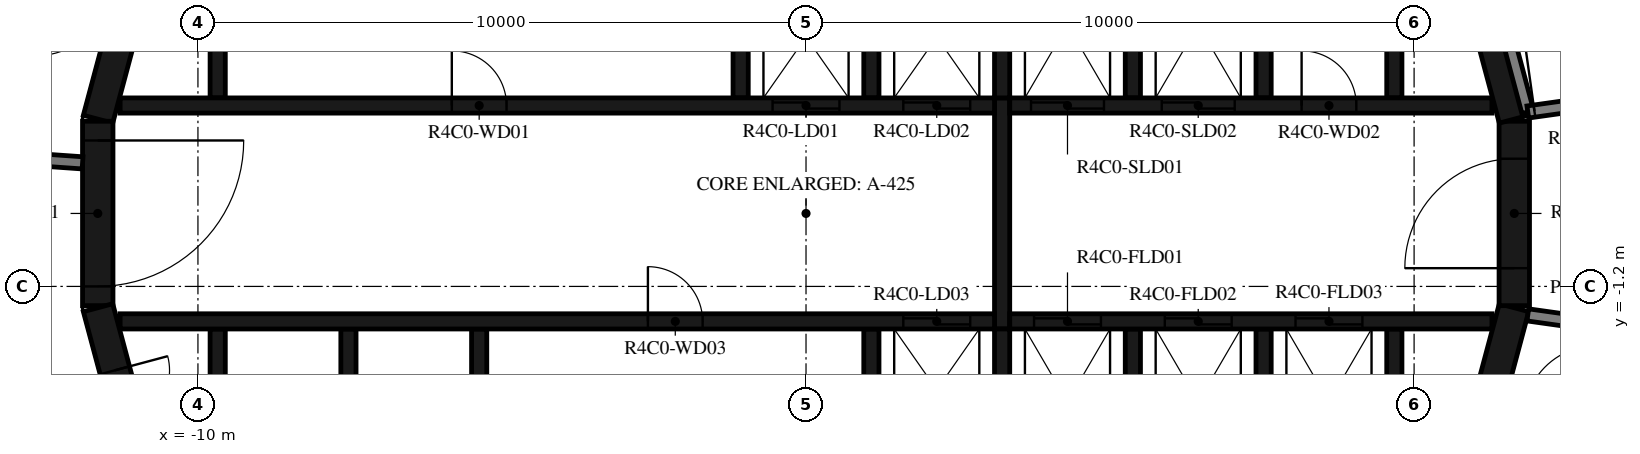
"""IFC4 building model, lengths in metres.
Left out: names, types, materials, properties, quantities, classifications, styles, units other than length and angle.
Written with IfcOpenShell. Run it as: python <this file> out.ifc"""

import sys

from ifc_helpers import new_model, si_unit, direction, frame, frame_2d, origin, place, context, subcontext, project, spatial, polyline, rectangle, outline, extrude, element, fill, save


model = new_model("IFC4")
c1 = context("Model", 3, precision=1e-05, world=origin(), true_north=direction((0.0, 1.0)))
c2 = subcontext(c1, "Body", "Model", "MODEL_VIEW")
j1 = project(units=[si_unit("LENGTHUNIT", "METRE"), si_unit("PLANEANGLEUNIT", "RADIAN")], contexts=[c1])
p1 = place(None, origin())
s1 = spatial("IfcSite", under=j1, at=p1, CompositionType="ELEMENT")
p2 = place(p1, origin())
s2 = spatial("IfcBuilding", under=s1, at=p2, CompositionType="ELEMENT")
p3 = place(p2, frame((0.0, 0.0, 179.7)))
s3 = spatial("IfcBuildingStorey", under=s2, at=p3, CompositionType="ELEMENT", Elevation=179.7)
p4 = place(p3, frame((10.858, -4.479, 0.0), z_axis=(0.0, 0.0, 1.0), x_axis=(0.258734743916, 0.965948410781, 0.0)))
e1 = element("IfcWall", 1, at=p4, inside=s3, PredefinedType="SHEAR", context=c2, shape_type="SweptSolid", body=[
    extrude(rectangle(XDim=3.033, YDim=0.5, at=frame_2d((1.516, 0.0))), origin(), (0.0, 0.0, 1.0), 3.05),
])
p5 = place(p3, frame((11.647, -1.516, 0.0), z_axis=(0.0, 0.0, 1.0), x_axis=(0.0, 1.0, 0.0)))
e2 = element("IfcWall", 2, at=p5, inside=s3, PredefinedType="SHEAR", context=c2, shape_type="SweptSolid", body=[
    extrude(rectangle(XDim=3.033, YDim=0.5, at=frame_2d((1.516, 0.0))), origin(), (0.0, 0.0, 1.0), 3.05),
])
p6 = place(p5, frame((0.616, 0.0, 0.0)))
e3 = element("IfcOpeningElement", 3, at=p6, cuts=e2, PredefinedType="OPENING", context=c2, shape_type="SweptSolid", body=[
    extrude(rectangle(XDim=1.8, YDim=2.1, at=frame_2d((0.9, 1.05))), frame((0.0, 0.26, 0.0), z_axis=(0.0, -1.0, 0.0), x_axis=(1.0, 0.0, 0.0)), (0.0, 0.0, 1.0), 0.52),
])
for number, where, z_axis, x_axis in (
    (4, (11.643, 1.55, 0.0), (0.0, 0.0, 1.0), (-0.259, 0.966, 0.0)),
    (5, (-10.858, 4.479, 0.0), (0.0, 0.0, 1.0), (-0.259, -0.966, 0.0)),
):
    element("IfcWall", number, at=place(p3, frame(where, z_axis=z_axis, x_axis=x_axis)), inside=s3, PredefinedType="SHEAR", context=c2, shape_type="SweptSolid", body=[
        extrude(rectangle(XDim=3.033, YDim=0.5, at=frame_2d((1.516, 0.0))), origin(), (0.0, 0.0, 1.0), 3.05),
    ])
p7 = place(p3, frame((-11.647, 1.516, 0.0), z_axis=(0.0, 0.0, 1.0), x_axis=(0.0, -1.0, 0.0)))
e6 = element("IfcWall", 6, at=p7, inside=s3, PredefinedType="SHEAR", context=c2, shape_type="SweptSolid", body=[
    extrude(rectangle(XDim=3.033, YDim=0.5, at=frame_2d((1.516, 0.0))), origin(), (0.0, 0.0, 1.0), 3.05),
])
p8 = place(p7, frame((0.316, 0.0, 0.0)))
e7 = element("IfcOpeningElement", 7, at=p8, cuts=e6, PredefinedType="OPENING", context=c2, shape_type="SweptSolid", body=[
    extrude(rectangle(XDim=2.4, YDim=2.1, at=frame_2d((1.2, 1.05))), frame((0.0, 0.26, 0.0), z_axis=(0.0, -1.0, 0.0), x_axis=(1.0, 0.0, 0.0)), (0.0, 0.0, 1.0), 0.52),
])
p9 = place(p3, frame((-11.643, -1.55, 0.0), z_axis=(0.0, 0.0, 1.0), x_axis=(0.258734743916, -0.965948410781, 0.0)))
e8 = element("IfcWall", 8, at=p9, inside=s3, PredefinedType="SHEAR", context=c2, shape_type="SweptSolid", body=[
    extrude(rectangle(XDim=3.033, YDim=0.5, at=frame_2d((1.516, 0.0))), origin(), (0.0, 0.0, 1.0), 3.05),
])
p10 = place(p9, frame((1.066, 0.0, 0.0)))
e9 = element("IfcOpeningElement", 9, at=p10, cuts=e8, PredefinedType="OPENING", context=c2, shape_type="SweptSolid", body=[
    extrude(rectangle(XDim=0.9, YDim=2.1, at=frame_2d((0.45, 1.05))), frame((0.0, 0.26, 0.0), z_axis=(0.0, -1.0, 0.0), x_axis=(1.0, 0.0, 0.0)), (0.0, 0.0, 1.0), 0.52),
])
p11 = place(p3, origin())
e10 = element("IfcWall", 10, at=p11, inside=s3, PredefinedType="SHEAR", context=c2, shape_type="SweptSolid", body=[
    extrude(outline(polyline([(-9.55, 4.8), (-1.2, 4.8), (-1.2, 1.9), (-0.95, 1.9), (-0.95, 4.8), (0.95, 4.8), (0.95, 1.9), (1.2, 1.9), (1.2, 4.8), (3.1, 4.8), (3.1, 1.9), (3.35, 1.9), (3.35, 4.8), (5.25, 4.8), (5.25, 1.9), (5.5, 1.9), (5.5, 4.8), (7.4, 4.8), (7.4, 1.9), (7.65, 1.9), (7.65, 4.8), (9.55, 4.8), (9.55, 1.9), (9.8, 1.9), (9.8, 4.8), (9.8, 5.05), (-9.8, 5.05), (-9.8, 4.8), (-9.8, 1.9), (-9.55, 1.9), (-9.55, 4.8)])), origin(), (0.0, 0.0, 1.0), 3.05),
])
p12 = place(p3, origin())
e11 = element("IfcWall", 11, at=p12, inside=s3, PredefinedType="SHEAR", context=c2, shape_type="SweptSolid", body=[
    extrude(outline(polyline([(9.8, -5.05), (9.8, -4.8), (9.8, -1.9), (9.55, -1.9), (9.55, -4.8), (7.65, -4.8), (7.65, -1.9), (7.4, -1.9), (7.4, -4.8), (5.5, -4.8), (5.5, -1.9), (5.25, -1.9), (5.25, -4.8), (3.35, -4.8), (3.35, -1.9), (3.1, -1.9), (3.1, -4.8), (1.2, -4.8), (1.2, -1.9), (0.95, -1.9), (0.95, -4.8), (-5.25, -4.8), (-5.25, -1.9), (-5.5, -1.9), (-5.5, -4.8), (-7.4, -4.8), (-7.4, -1.9), (-7.65, -1.9), (-7.65, -4.8), (-9.55, -4.8), (-9.55, -1.9), (-9.8, -1.9), (-9.8, -4.8), (-9.8, -5.05), (9.8, -5.05)])), origin(), (0.0, 0.0, 1.0), 3.05),
])
p13 = place(p3, frame((-11.28, 1.775, 0.0), z_axis=(0.0, 0.0, 1.0), x_axis=(1.0, 0.0, 0.0)))
e12 = element("IfcWall", 12, at=p13, inside=s3, PredefinedType="SHEAR", context=c2, shape_type="SweptSolid", body=[
    extrude(rectangle(XDim=14.38, YDim=0.25, at=frame_2d((7.19, 0.0))), origin(), (0.0, 0.0, 1.0), 3.05),
])
p14 = place(p13, frame((10.73, 0.0, 0.0)))
e13 = element("IfcOpeningElement", 13, at=p14, cuts=e12, PredefinedType="OPENING", context=c2, shape_type="SweptSolid", body=[
    extrude(rectangle(XDim=1.1, YDim=2.1, at=frame_2d((0.55, 1.05))), frame((0.0, 0.135, 0.0), z_axis=(0.0, -1.0, 0.0), x_axis=(1.0, 0.0, 0.0)), (0.0, 0.0, 1.0), 0.27),
])
p15 = place(p13, frame((12.88, 0.0, 0.0)))
e14 = element("IfcOpeningElement", 14, at=p15, cuts=e12, PredefinedType="OPENING", context=c2, shape_type="SweptSolid", body=[
    extrude(rectangle(XDim=1.1, YDim=2.1, at=frame_2d((0.55, 1.05))), frame((0.0, 0.135, 0.0), z_axis=(0.0, -1.0, 0.0), x_axis=(1.0, 0.0, 0.0)), (0.0, 0.0, 1.0), 0.27),
])
p16 = place(p13, frame((5.455, 0.0, 0.0)))
e15 = element("IfcOpeningElement", 15, at=p16, cuts=e12, PredefinedType="OPENING", context=c2, shape_type="SweptSolid", body=[
    extrude(rectangle(XDim=0.9, YDim=2.1, at=frame_2d((0.45, 1.05))), frame((0.0, 0.135, 0.0), z_axis=(0.0, -1.0, 0.0), x_axis=(1.0, 0.0, 0.0)), (0.0, 0.0, 1.0), 0.27),
])
p17 = place(p3, frame((3.35, 1.775, 0.0), z_axis=(0.0, 0.0, 1.0), x_axis=(1.0, 0.0, 0.0)))
e16 = element("IfcWall", 16, at=p17, inside=s3, PredefinedType="SHEAR", context=c2, shape_type="SweptSolid", body=[
    extrude(rectangle(XDim=7.93, YDim=0.25, at=frame_2d((3.965, 0.0))), origin(), (0.0, 0.0, 1.0), 3.05),
])
p18 = place(p17, frame((0.35, 0.0, 0.0)))
e17 = element("IfcOpeningElement", 17, at=p18, cuts=e16, PredefinedType="OPENING", context=c2, shape_type="SweptSolid", body=[
    extrude(rectangle(XDim=1.2, YDim=2.4, at=frame_2d((0.6, 1.2))), frame((0.0, 0.135, 0.0), z_axis=(0.0, -1.0, 0.0), x_axis=(1.0, 0.0, 0.0)), (0.0, 0.0, 1.0), 0.27),
])
p19 = place(p17, frame((2.5, 0.0, 0.0)))
e18 = element("IfcOpeningElement", 18, at=p19, cuts=e16, PredefinedType="OPENING", context=c2, shape_type="SweptSolid", body=[
    extrude(rectangle(XDim=1.2, YDim=2.4, at=frame_2d((0.6, 1.2))), frame((0.0, 0.135, 0.0), z_axis=(0.0, -1.0, 0.0), x_axis=(1.0, 0.0, 0.0)), (0.0, 0.0, 1.0), 0.27),
])
p20 = place(p17, frame((4.8, 0.0, 0.0)))
e19 = element("IfcOpeningElement", 19, at=p20, cuts=e16, PredefinedType="OPENING", context=c2, shape_type="SweptSolid", body=[
    extrude(rectangle(XDim=0.9, YDim=2.1, at=frame_2d((0.45, 1.05))), frame((0.0, 0.135, 0.0), z_axis=(0.0, -1.0, 0.0), x_axis=(1.0, 0.0, 0.0)), (0.0, 0.0, 1.0), 0.27),
])
p21 = place(p3, frame((-11.28, -1.775, 0.0), z_axis=(0.0, 0.0, 1.0), x_axis=(1.0, 0.0, 0.0)))
e20 = element("IfcWall", 20, at=p21, inside=s3, PredefinedType="SHEAR", context=c2, shape_type="SweptSolid", body=[
    extrude(rectangle(XDim=14.38, YDim=0.25, at=frame_2d((7.19, 0.0))), origin(), (0.0, 0.0, 1.0), 3.05),
])
p22 = place(p21, frame((12.88, 0.0, 0.0)))
e21 = element("IfcOpeningElement", 21, at=p22, cuts=e20, PredefinedType="OPENING", context=c2, shape_type="SweptSolid", body=[
    extrude(rectangle(XDim=1.1, YDim=2.1, at=frame_2d((0.55, 1.05))), frame((0.0, 0.135, 0.0), z_axis=(0.0, -1.0, 0.0), x_axis=(1.0, 0.0, 0.0)), (0.0, 0.0, 1.0), 0.27),
])
p23 = place(p21, frame((8.68, 0.0, 0.0)))
e22 = element("IfcOpeningElement", 22, at=p23, cuts=e20, PredefinedType="OPENING", context=c2, shape_type="SweptSolid", body=[
    extrude(rectangle(XDim=0.9, YDim=2.1, at=frame_2d((0.45, 1.05))), frame((0.0, 0.135, 0.0), z_axis=(0.0, -1.0, 0.0), x_axis=(1.0, 0.0, 0.0)), (0.0, 0.0, 1.0), 0.27),
])
p24 = place(p3, frame((3.35, -1.775, 0.0), z_axis=(0.0, 0.0, 1.0), x_axis=(1.0, 0.0, 0.0)))
e23 = element("IfcWall", 23, at=p24, inside=s3, PredefinedType="SHEAR", context=c2, shape_type="SweptSolid", body=[
    extrude(rectangle(XDim=7.93, YDim=0.25, at=frame_2d((3.965, 0.0))), origin(), (0.0, 0.0, 1.0), 3.05),
])
p25 = place(p24, frame((0.4, 0.0, 0.0)))
e24 = element("IfcOpeningElement", 24, at=p25, cuts=e23, PredefinedType="OPENING", context=c2, shape_type="SweptSolid", body=[
    extrude(rectangle(XDim=1.1, YDim=2.4, at=frame_2d((0.55, 1.2))), frame((0.0, 0.135, 0.0), z_axis=(0.0, -1.0, 0.0), x_axis=(1.0, 0.0, 0.0)), (0.0, 0.0, 1.0), 0.27),
])
p26 = place(p24, frame((2.55, 0.0, 0.0)))
e25 = element("IfcOpeningElement", 25, at=p26, cuts=e23, PredefinedType="OPENING", context=c2, shape_type="SweptSolid", body=[
    extrude(rectangle(XDim=1.1, YDim=2.4, at=frame_2d((0.55, 1.2))), frame((0.0, 0.135, 0.0), z_axis=(0.0, -1.0, 0.0), x_axis=(1.0, 0.0, 0.0)), (0.0, 0.0, 1.0), 0.27),
])
p27 = place(p24, frame((4.7, 0.0, 0.0)))
e26 = element("IfcOpeningElement", 26, at=p27, cuts=e23, PredefinedType="OPENING", context=c2, shape_type="SweptSolid", body=[
    extrude(rectangle(XDim=1.1, YDim=2.4, at=frame_2d((0.55, 1.2))), frame((0.0, 0.135, 0.0), z_axis=(0.0, -1.0, 0.0), x_axis=(1.0, 0.0, 0.0)), (0.0, 0.0, 1.0), 0.27),
])
p28 = place(p3, frame((3.225, -1.9, 0.0), z_axis=(0.0, 0.0, 1.0), x_axis=(0.0, 1.0, 0.0)))
e27 = element("IfcWall", 27, at=p28, inside=s3, PredefinedType="SHEAR", context=c2, shape_type="SweptSolid", body=[
    extrude(rectangle(XDim=3.8, YDim=0.25, at=frame_2d((1.9, 0.0))), origin(), (0.0, 0.0, 1.0), 3.05),
])
p29 = place(p3, frame((11.87, 1.668, 0.0), z_axis=(0.0, 0.0, 1.0), x_axis=(-0.258836880648, 0.965921047093, 0.0)))
e28 = element("IfcWall", 28, at=p29, inside=s3, PredefinedType="STANDARD", context=c2, shape_type="SweptSolid", body=[
    extrude(rectangle(XDim=1.695, YDim=0.2, at=frame_2d((0.848, 0.0))), origin(), (0.0, 0.0, 1.0), 3.05),
])
p30 = place(p3, frame((11.87, 1.668, 0.0), z_axis=(0.0, 0.0, 1.0), x_axis=(0.990270910415, 0.139152879904, 0.0)))
e29 = element("IfcWall", 29, at=p30, inside=s3, PredefinedType="STANDARD", context=c2, shape_type="SweptSolid", body=[
    extrude(rectangle(XDim=1.688, YDim=0.2, at=frame_2d((0.844, 0.0))), origin(), (0.0, 0.0, 1.0), 3.05),
])
p31 = place(p30, frame((0.11, 0.0, 0.0)))
e30 = element("IfcOpeningElement", 30, at=p31, cuts=e29, PredefinedType="OPENING", context=c2, shape_type="SweptSolid", body=[
    extrude(rectangle(XDim=1.2, YDim=2.0, at=frame_2d((0.6, 1.0))), frame((0.0, 0.11, 0.0), z_axis=(0.0, -1.0, 0.0), x_axis=(1.0, 0.0, 0.0)), (0.0, 0.0, 1.0), 0.22),
])
p32 = place(p3, frame((13.542, 1.903, 0.0), z_axis=(0.0, 0.0, 1.0), x_axis=(-0.333808508206, 0.942640907159, 0.0)))
e31 = element("IfcWall", 31, at=p32, inside=s3, PredefinedType="STANDARD", context=c2, shape_type="SweptSolid", body=[
    extrude(rectangle(XDim=6.317, YDim=0.2, at=frame_2d((3.158, 0.0))), origin(), (0.0, 0.0, 1.0), 3.05),
])
p33 = place(p3, frame((-13.454, 0.941, 0.0), z_axis=(0.0, 0.0, 1.0), x_axis=(0.99755155062, -0.069934997354, 0.0)))
e32 = element("IfcWall", 32, at=p33, inside=s3, PredefinedType="STANDARD", context=c2, shape_type="SweptSolid", body=[
    extrude(rectangle(XDim=1.561, YDim=0.2, at=frame_2d((0.78, 0.0))), origin(), (0.0, 0.0, 1.0), 3.05),
])
p34 = place(p3, frame((13.282, -1.867, 0.0), z_axis=(0.0, 0.0, 1.0), x_axis=(-0.990265430288, 0.139191873241, 0.0)))
e33 = element("IfcWall", 33, at=p34, inside=s3, PredefinedType="STANDARD", context=c2, shape_type="SweptSolid", body=[
    extrude(rectangle(XDim=1.426, YDim=0.2, at=frame_2d((0.713, 0.0))), origin(), (0.0, 0.0, 1.0), 3.05),
])
p35 = place(p8, origin())
e34 = element("IfcDoor", 34, at=p35, inside=s3, OperationType="DOUBLE_DOOR_SINGLE_SWING", PredefinedType="DOOR", context=c2, shape_type="SweptSolid", body=[
    extrude(rectangle(XDim=2.4, YDim=2.1, at=frame_2d((1.2, 1.05))), frame((0.0, 0.025, 0.0), z_axis=(0.0, -1.0, 0.0), x_axis=(1.0, 0.0, 0.0)), (0.0, 0.0, 1.0), 0.05),
])
fill(e7, e34)
p36 = place(p6, origin())
e35 = element("IfcDoor", 35, at=p36, inside=s3, OperationType="DOUBLE_DOOR_SINGLE_SWING", PredefinedType="DOOR", context=c2, shape_type="SweptSolid", body=[
    extrude(rectangle(XDim=1.8, YDim=2.1, at=frame_2d((0.9, 1.05))), frame((0.0, 0.025, 0.0), z_axis=(0.0, -1.0, 0.0), x_axis=(1.0, 0.0, 0.0)), (0.0, 0.0, 1.0), 0.05),
])
fill(e3, e35)
p37 = place(p14, origin())
e36 = element("IfcDoor", 36, at=p37, inside=s3, OperationType="DOUBLE_DOOR_SLIDING", PredefinedType="DOOR", context=c2, shape_type="SweptSolid", body=[
    extrude(rectangle(XDim=1.1, YDim=2.1, at=frame_2d((0.55, 1.05))), frame((0.0, 0.025, 0.0), z_axis=(0.0, -1.0, 0.0), x_axis=(1.0, 0.0, 0.0)), (0.0, 0.0, 1.0), 0.05),
])
fill(e13, e36)
p38 = place(p15, origin())
e37 = element("IfcDoor", 37, at=p38, inside=s3, OperationType="DOUBLE_DOOR_SLIDING", PredefinedType="DOOR", context=c2, shape_type="SweptSolid", body=[
    extrude(rectangle(XDim=1.1, YDim=2.1, at=frame_2d((0.55, 1.05))), frame((0.0, 0.025, 0.0), z_axis=(0.0, -1.0, 0.0), x_axis=(1.0, 0.0, 0.0)), (0.0, 0.0, 1.0), 0.05),
])
fill(e14, e37)
p39 = place(p18, origin())
e38 = element("IfcDoor", 38, at=p39, inside=s3, OperationType="DOUBLE_DOOR_SLIDING", PredefinedType="DOOR", context=c2, shape_type="SweptSolid", body=[
    extrude(rectangle(XDim=1.2, YDim=2.4, at=frame_2d((0.6, 1.2))), frame((0.0, 0.025, 0.0), z_axis=(0.0, -1.0, 0.0), x_axis=(1.0, 0.0, 0.0)), (0.0, 0.0, 1.0), 0.05),
])
fill(e17, e38)
p40 = place(p19, origin())
e39 = element("IfcDoor", 39, at=p40, inside=s3, OperationType="DOUBLE_DOOR_SLIDING", PredefinedType="DOOR", context=c2, shape_type="SweptSolid", body=[
    extrude(rectangle(XDim=1.2, YDim=2.4, at=frame_2d((0.6, 1.2))), frame((0.0, 0.025, 0.0), z_axis=(0.0, -1.0, 0.0), x_axis=(1.0, 0.0, 0.0)), (0.0, 0.0, 1.0), 0.05),
])
fill(e18, e39)
p41 = place(p22, origin())
e40 = element("IfcDoor", 40, at=p41, inside=s3, OperationType="DOUBLE_DOOR_SLIDING", PredefinedType="DOOR", context=c2, shape_type="SweptSolid", body=[
    extrude(rectangle(XDim=1.1, YDim=2.1, at=frame_2d((0.55, 1.05))), frame((0.0, 0.025, 0.0), z_axis=(0.0, -1.0, 0.0), x_axis=(1.0, 0.0, 0.0)), (0.0, 0.0, 1.0), 0.05),
])
fill(e21, e40)
p42 = place(p25, origin())
e41 = element("IfcDoor", 41, at=p42, inside=s3, OperationType="DOUBLE_DOOR_SLIDING", PredefinedType="DOOR", context=c2, shape_type="SweptSolid", body=[
    extrude(rectangle(XDim=1.1, YDim=2.4, at=frame_2d((0.55, 1.2))), frame((0.0, 0.025, 0.0), z_axis=(0.0, -1.0, 0.0), x_axis=(1.0, 0.0, 0.0)), (0.0, 0.0, 1.0), 0.05),
])
fill(e24, e41)
p43 = place(p26, origin())
e42 = element("IfcDoor", 42, at=p43, inside=s3, OperationType="DOUBLE_DOOR_SLIDING", PredefinedType="DOOR", context=c2, shape_type="SweptSolid", body=[
    extrude(rectangle(XDim=1.1, YDim=2.4, at=frame_2d((0.55, 1.2))), frame((0.0, 0.025, 0.0), z_axis=(0.0, -1.0, 0.0), x_axis=(1.0, 0.0, 0.0)), (0.0, 0.0, 1.0), 0.05),
])
fill(e25, e42)
p44 = place(p27, origin())
e43 = element("IfcDoor", 43, at=p44, inside=s3, OperationType="DOUBLE_DOOR_SLIDING", PredefinedType="DOOR", context=c2, shape_type="SweptSolid", body=[
    extrude(rectangle(XDim=1.1, YDim=2.4, at=frame_2d((0.55, 1.2))), frame((0.0, 0.025, 0.0), z_axis=(0.0, -1.0, 0.0), x_axis=(1.0, 0.0, 0.0)), (0.0, 0.0, 1.0), 0.05),
])
fill(e26, e43)
p45 = place(p16, origin())
e44 = element("IfcDoor", 44, at=p45, inside=s3, OperationType="SINGLE_SWING_LEFT", PredefinedType="DOOR", context=c2, shape_type="SweptSolid", body=[
    extrude(rectangle(XDim=0.9, YDim=2.1, at=frame_2d((0.45, 1.05))), frame((0.0, 0.025, 0.0), z_axis=(0.0, -1.0, 0.0), x_axis=(1.0, 0.0, 0.0)), (0.0, 0.0, 1.0), 0.05),
])
fill(e15, e44)
p46 = place(p20, origin())
e45 = element("IfcDoor", 45, at=p46, inside=s3, OperationType="SINGLE_SWING_RIGHT", PredefinedType="DOOR", context=c2, shape_type="SweptSolid", body=[
    extrude(rectangle(XDim=0.9, YDim=2.1, at=frame_2d((0.45, 1.05))), frame((0.0, 0.025, 0.0), z_axis=(0.0, -1.0, 0.0), x_axis=(1.0, 0.0, 0.0)), (0.0, 0.0, 1.0), 0.05),
])
fill(e19, e45)
p47 = place(p23, origin())
e46 = element("IfcDoor", 46, at=p47, inside=s3, OperationType="SINGLE_SWING_LEFT", PredefinedType="DOOR", context=c2, shape_type="SweptSolid", body=[
    extrude(rectangle(XDim=0.9, YDim=2.1, at=frame_2d((0.45, 1.05))), frame((0.0, 0.025, 0.0), z_axis=(0.0, -1.0, 0.0), x_axis=(1.0, 0.0, 0.0)), (0.0, 0.0, 1.0), 0.05),
])
fill(e22, e46)
p48 = place(p10, origin())
e47 = element("IfcDoor", 47, at=p48, inside=s3, OperationType="SINGLE_SWING_RIGHT", PredefinedType="DOOR", context=c2, shape_type="SweptSolid", body=[
    extrude(rectangle(XDim=0.9, YDim=2.1, at=frame_2d((0.45, 1.05))), frame((0.0, 0.025, 0.0), z_axis=(0.0, -1.0, 0.0), x_axis=(1.0, 0.0, 0.0)), (0.0, 0.0, 1.0), 0.05),
])
fill(e9, e47)
p49 = place(p31, origin())
e48 = element("IfcDoor", 48, at=p49, inside=s3, OperationType="DOUBLE_DOOR_SINGLE_SWING", PredefinedType="DOOR", context=c2, shape_type="SweptSolid", body=[
    extrude(rectangle(XDim=1.2, YDim=2.0, at=frame_2d((0.6, 1.0))), frame((0.0, 0.025, 0.0), z_axis=(0.0, -1.0, 0.0), x_axis=(1.0, 0.0, 0.0)), (0.0, 0.0, 1.0), 0.05),
])
fill(e30, e48)
save(model, sys.argv[1])
